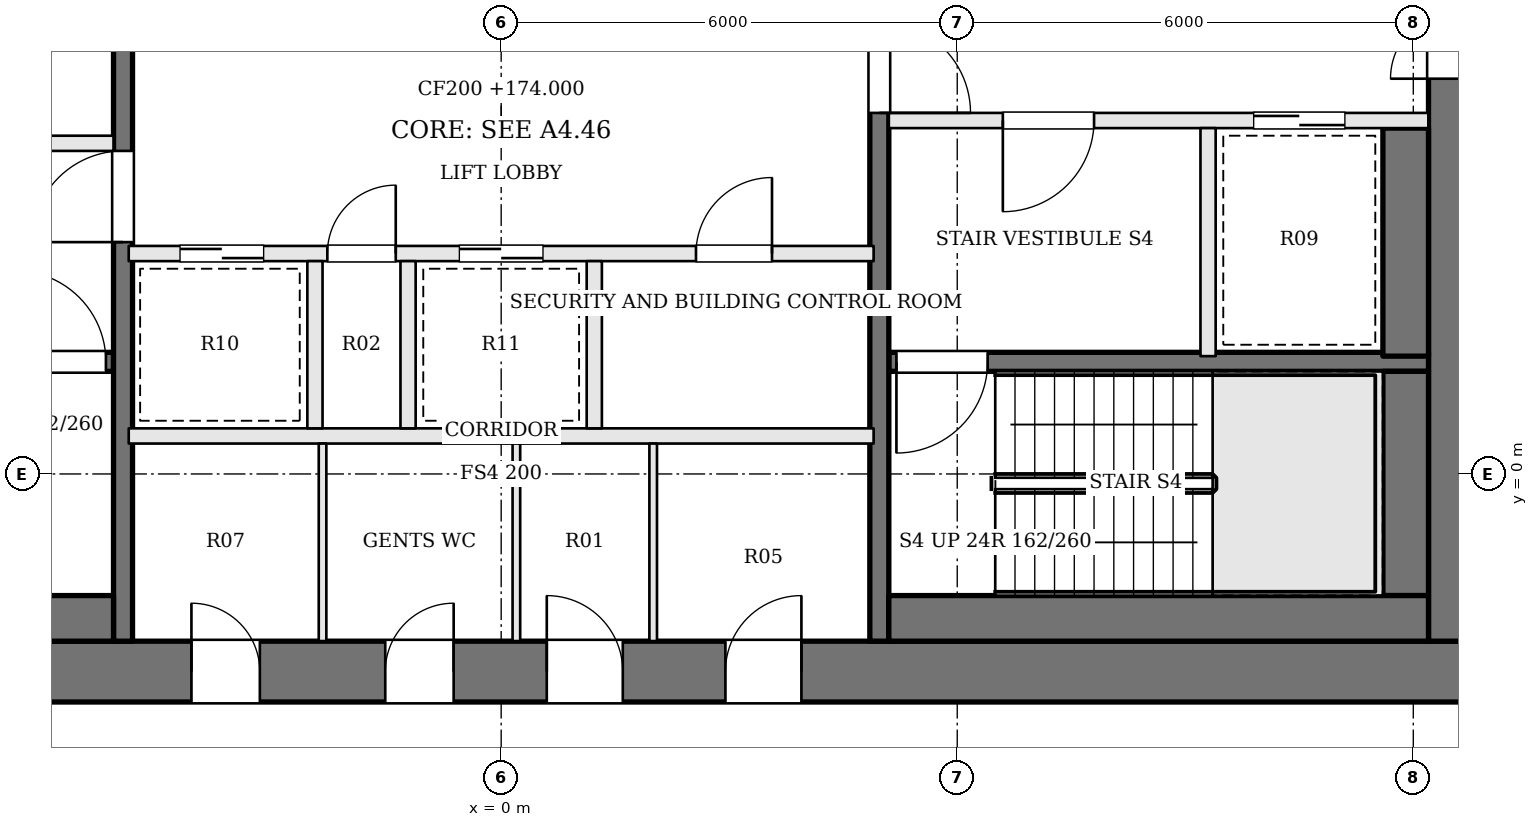
"""IFC4 building model, lengths in metres.
Left out: names, types, materials, properties, quantities, classifications, styles, units other than length and angle.
Written with IfcOpenShell. Run it as: python <this file> out.ifc"""

import sys

from ifc_helpers import new_model, si_unit, direction, frame, frame_2d, origin, place, context, subcontext, project, spatial, rectangle, extrude, element, fill, save


model = new_model("IFC4")
c1 = context("Model", 3, precision=1e-05, world=origin(), true_north=direction((0.0, 1.0)))
c2 = subcontext(c1, "Body", "Model", "MODEL_VIEW")
j1 = project(units=[si_unit("LENGTHUNIT", "METRE"), si_unit("PLANEANGLEUNIT", "RADIAN")], contexts=[c1])
p1 = place(None, origin())
s1 = spatial("IfcSite", under=j1, at=p1, CompositionType="ELEMENT")
p2 = place(p1, origin())
s2 = spatial("IfcBuilding", under=s1, at=p2, CompositionType="ELEMENT")
p3 = place(p2, frame((0.0, 0.0, 174.0)))
s3 = spatial("IfcBuildingStorey", under=s2, at=p3, CompositionType="ELEMENT", Elevation=174.0)
p4 = place(p3, frame((-13.0, -2.6, 0.0), z_axis=(0.0, 0.0, 1.0), x_axis=(1.0, 0.0, 0.0)))
e1 = element("IfcWall", 1, at=p4, inside=s3, PredefinedType="SHEAR", context=c2, shape_type="SweptSolid", body=[
    extrude(rectangle(XDim=26.0, YDim=0.8, at=frame_2d((13.0, 0.0))), origin(), (0.0, 0.0, 1.0), 3.9),
])
p5 = place(p4, frame((8.925, 0.0, 0.0)))
e2 = element("IfcOpeningElement", 2, at=p5, cuts=e1, PredefinedType="OPENING", context=c2, shape_type="SweptSolid", body=[
    extrude(rectangle(XDim=0.9, YDim=2.1, at=frame_2d((0.45, 1.05))), frame((0.0, 0.41, 0.0), z_axis=(0.0, -1.0, 0.0), x_axis=(1.0, 0.0, 0.0)), (0.0, 0.0, 1.0), 0.82),
])
p6 = place(p4, frame((11.475, 0.0, 0.0)))
e3 = element("IfcOpeningElement", 3, at=p6, cuts=e1, PredefinedType="OPENING", context=c2, shape_type="SweptSolid", body=[
    extrude(rectangle(XDim=0.9, YDim=2.1, at=frame_2d((0.45, 1.05))), frame((0.0, 0.41, 0.0), z_axis=(0.0, -1.0, 0.0), x_axis=(1.0, 0.0, 0.0)), (0.0, 0.0, 1.0), 0.82),
])
p7 = place(p4, frame((13.6, 0.0, 0.0)))
e4 = element("IfcOpeningElement", 4, at=p7, cuts=e1, PredefinedType="OPENING", context=c2, shape_type="SweptSolid", body=[
    extrude(rectangle(XDim=1.0, YDim=2.1, at=frame_2d((0.5, 1.05))), frame((0.0, 0.41, 0.0), z_axis=(0.0, -1.0, 0.0), x_axis=(1.0, 0.0, 0.0)), (0.0, 0.0, 1.0), 0.82),
])
p8 = place(p4, frame((15.95, 0.0, 0.0)))
e5 = element("IfcOpeningElement", 5, at=p8, cuts=e1, PredefinedType="OPENING", context=c2, shape_type="SweptSolid", body=[
    extrude(rectangle(XDim=1.0, YDim=2.1, at=frame_2d((0.5, 1.05))), frame((0.0, 0.41, 0.0), z_axis=(0.0, -1.0, 0.0), x_axis=(1.0, 0.0, 0.0)), (0.0, 0.0, 1.0), 0.82),
])
p9 = place(p3, frame((12.6, -2.2, 0.0), z_axis=(0.0, 0.0, 1.0), x_axis=(0.0, 1.0, 0.0)))
e6 = element("IfcWall", 6, at=p9, inside=s3, PredefinedType="SHEAR", context=c2, shape_type="SweptSolid", body=[
    extrude(rectangle(XDim=13.4, YDim=0.8, at=frame_2d((6.7, 0.0))), origin(), (0.0, 0.0, 1.0), 3.9),
])
p10 = place(p9, frame((7.4, 0.0, 0.0)))
e7 = element("IfcOpeningElement", 7, at=p10, cuts=e6, PredefinedType="OPENING", context=c2, shape_type="SweptSolid", body=[
    extrude(rectangle(XDim=1.8, YDim=2.1, at=frame_2d((0.9, 1.05))), frame((0.0, 0.41, 0.0), z_axis=(0.0, -1.0, 0.0), x_axis=(1.0, 0.0, 0.0)), (0.0, 0.0, 1.0), 0.82),
])
p11 = place(p3, frame((-12.2, 1.475, 0.0), z_axis=(0.0, 0.0, 1.0), x_axis=(1.0, 0.0, 0.0)))
e8 = element("IfcWall", 8, at=p11, inside=s3, PredefinedType="SOLIDWALL", context=c2, shape_type="SweptSolid", body=[
    extrude(rectangle(XDim=7.1, YDim=0.25, at=frame_2d((3.55, 0.0))), origin(), (0.0, 0.0, 1.0), 3.7),
])
p12 = place(p11, frame((5.8, 0.0, 0.0)))
e9 = element("IfcOpeningElement", 9, at=p12, cuts=e8, PredefinedType="OPENING", context=c2, shape_type="SweptSolid", body=[
    extrude(rectangle(XDim=1.2, YDim=2.1, at=frame_2d((0.6, 1.05))), frame((0.0, 0.135, 0.0), z_axis=(0.0, -1.0, 0.0), x_axis=(1.0, 0.0, 0.0)), (0.0, 0.0, 1.0), 0.27),
])
p13 = place(p3, frame((-12.2, 4.35, 0.0), z_axis=(0.0, 0.0, 1.0), x_axis=(1.0, 0.0, 0.0)))
e10 = element("IfcWall", 10, at=p13, inside=s3, PredefinedType="SOLIDWALL", context=c2, shape_type="SweptSolid", body=[
    extrude(rectangle(XDim=7.1, YDim=0.2, at=frame_2d((3.55, 0.0))), origin(), (0.0, 0.0, 1.0), 3.7),
])
p14 = place(p13, frame((4.4, 0.0, 0.0)))
e11 = element("IfcOpeningElement", 11, at=p14, cuts=e10, PredefinedType="OPENING", context=c2, shape_type="SweptSolid", body=[
    extrude(rectangle(XDim=1.2, YDim=2.1, at=frame_2d((0.6, 1.05))), frame((0.0, 0.11, 0.0), z_axis=(0.0, -1.0, 0.0), x_axis=(1.0, 0.0, 0.0)), (0.0, 0.0, 1.0), 0.22),
])
p15 = place(p13, frame((1.1, 0.0, 0.0)))
e12 = element("IfcOpeningElement", 12, at=p15, cuts=e10, PredefinedType="OPENING", context=c2, shape_type="SweptSolid", body=[
    extrude(rectangle(XDim=1.2, YDim=2.1, at=frame_2d((0.6, 1.05))), frame((0.0, 0.11, 0.0), z_axis=(0.0, -1.0, 0.0), x_axis=(1.0, 0.0, 0.0)), (0.0, 0.0, 1.0), 0.22),
])
p16 = place(p3, frame((12.2, 4.65, 0.0), z_axis=(0.0, 0.0, 1.0), x_axis=(-1.0, 0.0, 0.0)))
e13 = element("IfcWall", 13, at=p16, inside=s3, PredefinedType="SOLIDWALL", context=c2, shape_type="SweptSolid", body=[
    extrude(rectangle(XDim=7.1, YDim=0.2, at=frame_2d((3.55, 0.0))), origin(), (0.0, 0.0, 1.0), 3.7),
])
p17 = place(p16, frame((4.4, 0.0, 0.0)))
e14 = element("IfcOpeningElement", 14, at=p17, cuts=e13, PredefinedType="OPENING", context=c2, shape_type="SweptSolid", body=[
    extrude(rectangle(XDim=1.2, YDim=2.1, at=frame_2d((0.6, 1.05))), frame((0.0, 0.11, 0.0), z_axis=(0.0, -1.0, 0.0), x_axis=(1.0, 0.0, 0.0)), (0.0, 0.0, 1.0), 0.22),
])
p18 = place(p16, frame((1.1, 0.0, 0.0)))
e15 = element("IfcOpeningElement", 15, at=p18, cuts=e13, PredefinedType="OPENING", context=c2, shape_type="SweptSolid", body=[
    extrude(rectangle(XDim=1.2, YDim=2.1, at=frame_2d((0.6, 1.05))), frame((0.0, 0.11, 0.0), z_axis=(0.0, -1.0, 0.0), x_axis=(1.0, 0.0, 0.0)), (0.0, 0.0, 1.0), 0.22),
])
p19 = place(p3, frame((12.2, 1.475, 0.0), z_axis=(0.0, 0.0, 1.0), x_axis=(-1.0, 0.0, 0.0)))
e16 = element("IfcWall", 16, at=p19, inside=s3, PredefinedType="SOLIDWALL", context=c2, shape_type="SweptSolid", body=[
    extrude(rectangle(XDim=7.1, YDim=0.25, at=frame_2d((3.55, 0.0))), origin(), (0.0, 0.0, 1.0), 3.7),
])
p20 = place(p19, frame((5.8, 0.0, 0.0)))
e17 = element("IfcOpeningElement", 17, at=p20, cuts=e16, PredefinedType="OPENING", context=c2, shape_type="SweptSolid", body=[
    extrude(rectangle(XDim=1.2, YDim=2.1, at=frame_2d((0.6, 1.05))), frame((0.0, 0.135, 0.0), z_axis=(0.0, -1.0, 0.0), x_axis=(1.0, 0.0, 0.0)), (0.0, 0.0, 1.0), 0.27),
])
p21 = place(p3, frame((9.3, 4.55, 0.0), z_axis=(0.0, 0.0, 1.0), x_axis=(0.0, -1.0, 0.0)))
e18 = element("IfcWall", 18, at=p21, inside=s3, PredefinedType="SOLIDWALL", context=c2, shape_type="SweptSolid", body=[
    extrude(rectangle(XDim=3.0, YDim=0.2, at=frame_2d((1.5, 0.0))), origin(), (0.0, 0.0, 1.0), 3.7),
])
p22 = place(p3, frame((-4.975, -2.2, 0.0), z_axis=(0.0, 0.0, 1.0), x_axis=(0.0, 1.0, 0.0)))
e19 = element("IfcWall", 19, at=p22, inside=s3, PredefinedType="SOLIDWALL", context=c2, shape_type="SweptSolid", body=[
    extrude(rectangle(XDim=13.4, YDim=0.25, at=frame_2d((6.7, 0.0))), origin(), (0.0, 0.0, 1.0), 3.7),
])
p23 = place(p22, frame((5.25, 0.0, 0.0)))
e20 = element("IfcOpeningElement", 20, at=p23, cuts=e19, PredefinedType="OPENING", context=c2, shape_type="SweptSolid", body=[
    extrude(rectangle(XDim=1.2, YDim=2.1, at=frame_2d((0.6, 1.05))), frame((0.0, 0.135, 0.0), z_axis=(0.0, -1.0, 0.0), x_axis=(1.0, 0.0, 0.0)), (0.0, 0.0, 1.0), 0.27),
])
p24 = place(p3, frame((4.975, 11.2, 0.0), z_axis=(0.0, 0.0, 1.0), x_axis=(0.0, -1.0, 0.0)))
e21 = element("IfcWall", 21, at=p24, inside=s3, PredefinedType="SOLIDWALL", context=c2, shape_type="SweptSolid", body=[
    extrude(rectangle(XDim=13.4, YDim=0.25, at=frame_2d((6.7, 0.0))), origin(), (0.0, 0.0, 1.0), 3.7),
])
p25 = place(p24, frame((5.25, 0.0, 0.0)))
e22 = element("IfcOpeningElement", 22, at=p25, cuts=e21, PredefinedType="OPENING", context=c2, shape_type="SweptSolid", body=[
    extrude(rectangle(XDim=1.2, YDim=2.1, at=frame_2d((0.6, 1.05))), frame((0.0, 0.135, 0.0), z_axis=(0.0, -1.0, 0.0), x_axis=(1.0, 0.0, 0.0)), (0.0, 0.0, 1.0), 0.27),
])
p26 = place(p3, frame((-12.2, -1.9, 0.0), z_axis=(0.0, 0.0, 1.0), x_axis=(1.0, 0.0, 0.0)))
e23 = element("IfcWall", 23, at=p26, inside=s3, PredefinedType="SOLIDWALL", context=c2, shape_type="SweptSolid", body=[
    extrude(rectangle(XDim=7.1, YDim=0.6, at=frame_2d((3.55, 0.0))), origin(), (0.0, 0.0, 1.0), 3.7),
])
p27 = place(p3, frame((11.9, 4.55, 0.0), z_axis=(0.0, 0.0, 1.0), x_axis=(0.0, -1.0, 0.0)))
e24 = element("IfcWall", 24, at=p27, inside=s3, PredefinedType="SOLIDWALL", context=c2, shape_type="SweptSolid", body=[
    extrude(rectangle(XDim=3.0, YDim=0.6, at=frame_2d((1.5, 0.0))), origin(), (0.0, 0.0, 1.0), 3.7),
])
p28 = place(p3, frame((11.9, 1.35, 0.0), z_axis=(0.0, 0.0, 1.0), x_axis=(0.0, -1.0, 0.0)))
e25 = element("IfcWall", 25, at=p28, inside=s3, PredefinedType="SOLIDWALL", context=c2, shape_type="SweptSolid", body=[
    extrude(rectangle(XDim=2.95, YDim=0.6, at=frame_2d((1.475, 0.0))), origin(), (0.0, 0.0, 1.0), 3.7),
])
p29 = place(p3, frame((12.2, -1.9, 0.0), z_axis=(0.0, 0.0, 1.0), x_axis=(-1.0, 0.0, 0.0)))
e26 = element("IfcWall", 26, at=p29, inside=s3, PredefinedType="SOLIDWALL", context=c2, shape_type="SweptSolid", body=[
    extrude(rectangle(XDim=7.1, YDim=0.6, at=frame_2d((3.55, 0.0))), origin(), (0.0, 0.0, 1.0), 3.7),
])
p30 = place(p3, frame((-4.9, 0.5, 0.0), z_axis=(0.0, 0.0, 1.0), x_axis=(1.0, 0.0, 0.0)))
e27 = element("IfcWall", 27, at=p30, inside=s3, PredefinedType="SOLIDWALL", context=c2, shape_type="SweptSolid", body=[
    extrude(rectangle(XDim=9.8, YDim=0.2, at=frame_2d((4.9, 0.0))), origin(), (0.0, 0.0, 1.0), 3.7),
])
p31 = place(p3, frame((-4.9, 2.9, 0.0), z_axis=(0.0, 0.0, 1.0), x_axis=(1.0, 0.0, 0.0)))
e28 = element("IfcWall", 28, at=p31, inside=s3, PredefinedType="SOLIDWALL", context=c2, shape_type="SweptSolid", body=[
    extrude(rectangle(XDim=9.8, YDim=0.2, at=frame_2d((4.9, 0.0))), origin(), (0.0, 0.0, 1.0), 3.7),
])
p32 = place(p31, frame((0.675, 0.0, 0.0)))
e29 = element("IfcOpeningElement", 29, at=p32, cuts=e28, PredefinedType="OPENING", context=c2, shape_type="SweptSolid", body=[
    extrude(rectangle(XDim=1.1, YDim=2.1, at=frame_2d((0.55, 1.05))), frame((0.0, 0.11, 0.0), z_axis=(0.0, -1.0, 0.0), x_axis=(1.0, 0.0, 0.0)), (0.0, 0.0, 1.0), 0.22),
])
p33 = place(p31, frame((2.613, 0.0, 0.0)))
e30 = element("IfcOpeningElement", 30, at=p33, cuts=e28, PredefinedType="OPENING", context=c2, shape_type="SweptSolid", body=[
    extrude(rectangle(XDim=0.9, YDim=2.1, at=frame_2d((0.45, 1.05))), frame((0.0, 0.11, 0.0), z_axis=(0.0, -1.0, 0.0), x_axis=(1.0, 0.0, 0.0)), (0.0, 0.0, 1.0), 0.22),
])
p34 = place(p31, frame((4.35, 0.0, 0.0)))
e31 = element("IfcOpeningElement", 31, at=p34, cuts=e28, PredefinedType="OPENING", context=c2, shape_type="SweptSolid", body=[
    extrude(rectangle(XDim=1.1, YDim=2.1, at=frame_2d((0.55, 1.05))), frame((0.0, 0.11, 0.0), z_axis=(0.0, -1.0, 0.0), x_axis=(1.0, 0.0, 0.0)), (0.0, 0.0, 1.0), 0.22),
])
p35 = place(p31, frame((7.463, 0.0, 0.0)))
e32 = element("IfcOpeningElement", 32, at=p35, cuts=e28, PredefinedType="OPENING", context=c2, shape_type="SweptSolid", body=[
    extrude(rectangle(XDim=1.0, YDim=2.1, at=frame_2d((0.5, 1.05))), frame((0.0, 0.11, 0.0), z_axis=(0.0, -1.0, 0.0), x_axis=(1.0, 0.0, 0.0)), (0.0, 0.0, 1.0), 0.22),
])
for number, where, z_axis, x_axis in (
    (33, (-2.45, 0.6, 0.0), (0.0, 0.0, 1.0), (0.0, 1.0, 0.0)),
    (34, (-1.225, 0.6, 0.0), (0.0, 0.0, 1.0), (0.0, 1.0, 0.0)),
    (35, (1.225, 0.6, 0.0), (0.0, 0.0, 1.0), (0.0, 1.0, 0.0)),
):
    element("IfcWall", number, at=place(p3, frame(where, z_axis=z_axis, x_axis=x_axis)), inside=s3, PredefinedType="SOLIDWALL", context=c2, shape_type="SweptSolid", body=[
        extrude(rectangle(XDim=2.2, YDim=0.2, at=frame_2d((1.1, 0.0))), origin(), (0.0, 0.0, 1.0), 3.7),
    ])
for number, where, z_axis, x_axis in (
    (36, (-2.35, -2.2, 0.0), (0.0, 0.0, 1.0), (0.0, 1.0, 0.0)),
    (37, (0.2, -2.2, 0.0), (0.0, 0.0, 1.0), (0.0, 1.0, 0.0)),
    (38, (2.0, -2.2, 0.0), (0.0, 0.0, 1.0), (0.0, 1.0, 0.0)),
):
    element("IfcWall", number, at=place(p3, frame(where, z_axis=z_axis, x_axis=x_axis)), inside=s3, PredefinedType="PARTITIONING", context=c2, shape_type="SweptSolid", body=[
        extrude(rectangle(XDim=2.6, YDim=0.1, at=frame_2d((1.3, 0.0))), origin(), (0.0, 0.0, 1.0), 3.7),
    ])
p36 = place(p10, origin())
e39 = element("IfcDoor", 39, at=p36, inside=s3, OperationType="DOUBLE_DOOR_SINGLE_SWING", PredefinedType="DOOR", context=c2, shape_type="SweptSolid", body=[
    extrude(rectangle(XDim=1.8, YDim=2.1, at=frame_2d((0.9, 1.05))), frame((0.0, 0.025, 0.0), z_axis=(0.0, -1.0, 0.0), x_axis=(1.0, 0.0, 0.0)), (0.0, 0.0, 1.0), 0.05),
])
fill(e7, e39)
p37 = place(p23, origin())
e40 = element("IfcDoor", 40, at=p37, inside=s3, OperationType="SINGLE_SWING_LEFT", PredefinedType="DOOR", context=c2, shape_type="SweptSolid", body=[
    extrude(rectangle(XDim=1.2, YDim=2.1, at=frame_2d((0.6, 1.05))), frame((0.0, 0.025, 0.0), z_axis=(0.0, -1.0, 0.0), x_axis=(1.0, 0.0, 0.0)), (0.0, 0.0, 1.0), 0.05),
])
fill(e20, e40)
p38 = place(p25, origin())
e41 = element("IfcDoor", 41, at=p38, inside=s3, OperationType="SINGLE_SWING_RIGHT", PredefinedType="DOOR", context=c2, shape_type="SweptSolid", body=[
    extrude(rectangle(XDim=1.2, YDim=2.1, at=frame_2d((0.6, 1.05))), frame((0.0, 0.025, 0.0), z_axis=(0.0, -1.0, 0.0), x_axis=(1.0, 0.0, 0.0)), (0.0, 0.0, 1.0), 0.05),
])
fill(e22, e41)
p39 = place(p17, origin())
e42 = element("IfcDoor", 42, at=p39, inside=s3, OperationType="SINGLE_SWING_RIGHT", PredefinedType="DOOR", context=c2, shape_type="SweptSolid", body=[
    extrude(rectangle(XDim=1.2, YDim=2.1, at=frame_2d((0.6, 1.05))), frame((0.0, 0.025, 0.0), z_axis=(0.0, -1.0, 0.0), x_axis=(1.0, 0.0, 0.0)), (0.0, 0.0, 1.0), 0.05),
])
fill(e14, e42)
p40 = place(p12, origin())
e43 = element("IfcDoor", 43, at=p40, inside=s3, OperationType="SINGLE_SWING_LEFT", PredefinedType="DOOR", context=c2, shape_type="SweptSolid", body=[
    extrude(rectangle(XDim=1.2, YDim=2.1, at=frame_2d((0.6, 1.05))), frame((0.0, 0.025, 0.0), z_axis=(0.0, -1.0, 0.0), x_axis=(1.0, 0.0, 0.0)), (0.0, 0.0, 1.0), 0.05),
])
fill(e9, e43)
p41 = place(p20, origin())
e44 = element("IfcDoor", 44, at=p41, inside=s3, OperationType="SINGLE_SWING_RIGHT", PredefinedType="DOOR", context=c2, shape_type="SweptSolid", body=[
    extrude(rectangle(XDim=1.2, YDim=2.1, at=frame_2d((0.6, 1.05))), frame((0.0, 0.025, 0.0), z_axis=(0.0, -1.0, 0.0), x_axis=(1.0, 0.0, 0.0)), (0.0, 0.0, 1.0), 0.05),
])
fill(e17, e44)
p42 = place(p18, origin())
e45 = element("IfcDoor", 45, at=p42, inside=s3, OperationType="SLIDING_TO_RIGHT", PredefinedType="DOOR", context=c2, shape_type="SweptSolid", body=[
    extrude(rectangle(XDim=1.2, YDim=2.1, at=frame_2d((0.6, 1.05))), frame((0.0, 0.025, 0.0), z_axis=(0.0, -1.0, 0.0), x_axis=(1.0, 0.0, 0.0)), (0.0, 0.0, 1.0), 0.05),
])
fill(e15, e45)
p43 = place(p32, origin())
e46 = element("IfcDoor", 46, at=p43, inside=s3, OperationType="SLIDING_TO_RIGHT", PredefinedType="DOOR", context=c2, shape_type="SweptSolid", body=[
    extrude(rectangle(XDim=1.1, YDim=2.1, at=frame_2d((0.55, 1.05))), frame((0.0, 0.025, 0.0), z_axis=(0.0, -1.0, 0.0), x_axis=(1.0, 0.0, 0.0)), (0.0, 0.0, 1.0), 0.05),
])
fill(e29, e46)
p44 = place(p33, origin())
e47 = element("IfcDoor", 47, at=p44, inside=s3, OperationType="SINGLE_SWING_RIGHT", PredefinedType="DOOR", context=c2, shape_type="SweptSolid", body=[
    extrude(rectangle(XDim=0.9, YDim=2.1, at=frame_2d((0.45, 1.05))), frame((0.0, 0.025, 0.0), z_axis=(0.0, -1.0, 0.0), x_axis=(1.0, 0.0, 0.0)), (0.0, 0.0, 1.0), 0.05),
])
fill(e30, e47)
p45 = place(p34, origin())
e48 = element("IfcDoor", 48, at=p45, inside=s3, OperationType="SLIDING_TO_LEFT", PredefinedType="DOOR", context=c2, shape_type="SweptSolid", body=[
    extrude(rectangle(XDim=1.1, YDim=2.1, at=frame_2d((0.55, 1.05))), frame((0.0, 0.025, 0.0), z_axis=(0.0, -1.0, 0.0), x_axis=(1.0, 0.0, 0.0)), (0.0, 0.0, 1.0), 0.05),
])
fill(e31, e48)
p46 = place(p35, origin())
e49 = element("IfcDoor", 49, at=p46, inside=s3, OperationType="SINGLE_SWING_RIGHT", PredefinedType="DOOR", context=c2, shape_type="SweptSolid", body=[
    extrude(rectangle(XDim=1.0, YDim=2.1, at=frame_2d((0.5, 1.05))), frame((0.0, 0.025, 0.0), z_axis=(0.0, -1.0, 0.0), x_axis=(1.0, 0.0, 0.0)), (0.0, 0.0, 1.0), 0.05),
])
fill(e32, e49)
p47 = place(p5, origin())
e50 = element("IfcDoor", 50, at=p47, inside=s3, OperationType="SINGLE_SWING_LEFT", PredefinedType="DOOR", context=c2, shape_type="SweptSolid", body=[
    extrude(rectangle(XDim=0.9, YDim=2.1, at=frame_2d((0.45, 1.05))), frame((0.0, 0.025, 0.0), z_axis=(0.0, -1.0, 0.0), x_axis=(1.0, 0.0, 0.0)), (0.0, 0.0, 1.0), 0.05),
])
fill(e2, e50)
p48 = place(p6, origin())
e51 = element("IfcDoor", 51, at=p48, inside=s3, OperationType="SINGLE_SWING_RIGHT", PredefinedType="DOOR", context=c2, shape_type="SweptSolid", body=[
    extrude(rectangle(XDim=0.9, YDim=2.1, at=frame_2d((0.45, 1.05))), frame((0.0, 0.025, 0.0), z_axis=(0.0, -1.0, 0.0), x_axis=(1.0, 0.0, 0.0)), (0.0, 0.0, 1.0), 0.05),
])
fill(e3, e51)
p49 = place(p7, origin())
e52 = element("IfcDoor", 52, at=p49, inside=s3, OperationType="SINGLE_SWING_LEFT", PredefinedType="DOOR", context=c2, shape_type="SweptSolid", body=[
    extrude(rectangle(XDim=1.0, YDim=2.1, at=frame_2d((0.5, 1.05))), frame((0.0, 0.025, 0.0), z_axis=(0.0, -1.0, 0.0), x_axis=(1.0, 0.0, 0.0)), (0.0, 0.0, 1.0), 0.05),
])
fill(e4, e52)
p50 = place(p8, origin())
e53 = element("IfcDoor", 53, at=p50, inside=s3, OperationType="SINGLE_SWING_RIGHT", PredefinedType="DOOR", context=c2, shape_type="SweptSolid", body=[
    extrude(rectangle(XDim=1.0, YDim=2.1, at=frame_2d((0.5, 1.05))), frame((0.0, 0.025, 0.0), z_axis=(0.0, -1.0, 0.0), x_axis=(1.0, 0.0, 0.0)), (0.0, 0.0, 1.0), 0.05),
])
fill(e5, e53)
save(model, sys.argv[1])
